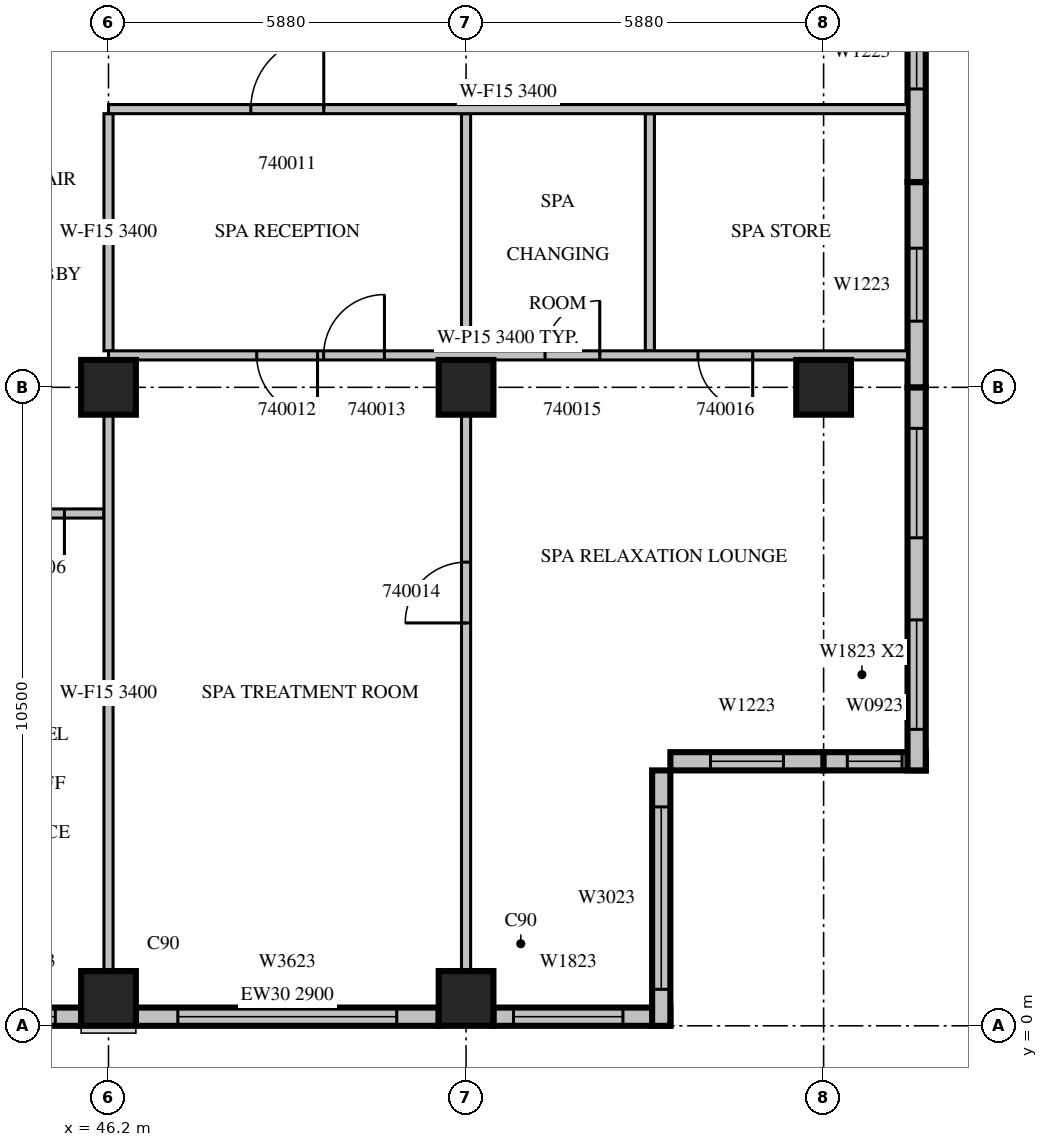
"""IFC4 building model, lengths in metres.
Left out: names, types, materials, properties, quantities, classifications, styles, units other than length and angle.
Written with IfcOpenShell. Run it as: python <this file> out.ifc"""

import sys

from ifc_helpers import new_model, si_unit, direction, frame, frame_2d, origin, origin_2d, place, context, subcontext, project, spatial, rectangle, extrude, source, transform, mapped, element, fill, save


model = new_model("IFC4")
c1 = context("Model", 3, precision=1e-05, world=origin(), true_north=direction((0.0, 1.0)))
c2 = subcontext(c1, "Body", "Model", "MODEL_VIEW")
j1 = project(units=[si_unit("LENGTHUNIT", "METRE"), si_unit("PLANEANGLEUNIT", "RADIAN")], contexts=[c1])
p1 = place(None, origin())
s1 = spatial("IfcSite", under=j1, at=p1, CompositionType="ELEMENT")
p2 = place(p1, origin())
s2 = spatial("IfcBuilding", under=s1, at=p2, CompositionType="ELEMENT")
p3 = place(p2, frame((0.0, 0.0, 185.4)))
s3 = spatial("IfcBuildingStorey", under=s2, at=p3, CompositionType="ELEMENT", Elevation=185.4)
m1 = source(origin(), c2, "Body", "SweptSolid", [
    extrude(rectangle(XDim=0.9, YDim=0.9, at=origin_2d()), origin(), (0.0, 0.0, 1.0), 3.8),
])
for number, where, z_axis, x_axis in (
    (1, (46.2, 0.45, 0.0), (0.0, 0.0, 1.0), (1.0, 0.0, 0.0)),
    (2, (52.08, 0.45, 0.0), (0.0, 0.0, 1.0), (1.0, 0.0, 0.0)),
    (3, (46.2, 10.5, 0.0), (0.0, 0.0, 1.0), (1.0, 0.0, 0.0)),
    (4, (52.08, 10.5, 0.0), (0.0, 0.0, 1.0), (1.0, 0.0, 0.0)),
    (5, (57.96, 10.5, 0.0), (0.0, 0.0, 1.0), (1.0, 0.0, 0.0)),
):
    element("IfcColumn", number, at=place(p3, frame(where, z_axis=z_axis, x_axis=x_axis)), inside=s3, PredefinedType="COLUMN", context=c2, shape_type="MappedRepresentation", body=[
        mapped(m1, transform((0.0, 0.0, 0.0), scale=1.0)),
    ])
m2 = source(origin(), c2, "Body", "SweptSolid", [
    extrude(rectangle(XDim=1.75, YDim=0.3, at=frame_2d((0.875, 0.0))), origin(), (0.0, 0.0, 1.0), 3.4),
])
p4 = place(p3, frame((44.0, 0.15, 0.0), z_axis=(0.0, 0.0, 1.0), x_axis=(1.0, 0.0, 0.0)))
e6 = element("IfcWall", 6, at=p4, inside=s3, PredefinedType="STANDARD", context=c2, shape_type="MappedRepresentation", body=[
    mapped(m2, transform((0.0, 0.0, 0.0), scale=1.0)),
])
m3 = source(origin(), c2, "Body", "SweptSolid", [
    extrude(rectangle(XDim=0.9, YDim=2.3, at=frame_2d((0.45, 1.15))), frame((0.0, 0.16, 0.0), z_axis=(0.0, -1.0, 0.0), x_axis=(1.0, 0.0, 0.0)), (0.0, 0.0, 1.0), 0.32),
])
p5 = place(p4, frame((0.425, 0.0, 0.6)))
e7 = element("IfcOpeningElement", 7, at=p5, cuts=e6, PredefinedType="OPENING", context=c2, shape_type="MappedRepresentation", body=[
    mapped(m3, transform((0.0, 0.0, 0.0), scale=1.0)),
])
p6 = place(p3, frame((46.65, 0.15, 0.0), z_axis=(0.0, 0.0, 1.0), x_axis=(1.0, 0.0, 0.0)))
e8 = element("IfcWall", 8, at=p6, inside=s3, PredefinedType="STANDARD", context=c2, shape_type="SweptSolid", body=[
    extrude(rectangle(XDim=4.98, YDim=0.3, at=frame_2d((2.49, 0.0))), origin(), (0.0, 0.0, 1.0), 2.9),
])
m4 = source(origin(), c2, "Body", "SweptSolid", [
    extrude(rectangle(XDim=3.6, YDim=2.3, at=frame_2d((1.8, 1.15))), frame((0.0, 0.16, 0.0), z_axis=(0.0, -1.0, 0.0), x_axis=(1.0, 0.0, 0.0)), (0.0, 0.0, 1.0), 0.32),
])
p7 = place(p6, frame((0.69, 0.0, 0.6)))
e9 = element("IfcOpeningElement", 9, at=p7, cuts=e8, PredefinedType="OPENING", context=c2, shape_type="MappedRepresentation", body=[
    mapped(m4, transform((0.0, 0.0, 0.0), scale=1.0)),
])
m5 = source(origin(), c2, "Body", "SweptSolid", [
    extrude(rectangle(XDim=2.91, YDim=0.3, at=frame_2d((1.455, 0.0))), origin(), (0.0, 0.0, 1.0), 3.4),
])
p8 = place(p3, frame((52.53, 0.15, 0.0), z_axis=(0.0, 0.0, 1.0), x_axis=(1.0, 0.0, 0.0)))
e10 = element("IfcWall", 10, at=p8, inside=s3, PredefinedType="STANDARD", context=c2, shape_type="MappedRepresentation", body=[
    mapped(m5, transform((0.0, 0.0, 0.0), scale=1.0)),
])
m6 = source(origin(), c2, "Body", "SweptSolid", [
    extrude(rectangle(XDim=1.8, YDim=2.3, at=frame_2d((0.9, 1.15))), frame((0.0, 0.16, 0.0), z_axis=(0.0, -1.0, 0.0), x_axis=(1.0, 0.0, 0.0)), (0.0, 0.0, 1.0), 0.32),
])
p9 = place(p8, frame((0.33, 0.0, 0.6)))
e11 = element("IfcOpeningElement", 11, at=p9, cuts=e10, PredefinedType="OPENING", context=c2, shape_type="MappedRepresentation", body=[
    mapped(m6, transform((0.0, 0.0, 0.0), scale=1.0)),
])
m7 = source(origin(), c2, "Body", "SweptSolid", [
    extrude(rectangle(XDim=4.2, YDim=0.3, at=frame_2d((2.1, 0.0))), origin(), (0.0, 0.0, 1.0), 3.4),
])
p10 = place(p3, frame((55.29, 0.0, 0.0), z_axis=(0.0, 0.0, 1.0), x_axis=(0.0, 1.0, 0.0)))
e12 = element("IfcWall", 12, at=p10, inside=s3, PredefinedType="STANDARD", context=c2, shape_type="MappedRepresentation", body=[
    mapped(m7, transform((0.0, 0.0, 0.0), scale=1.0)),
])
m8 = source(origin(), c2, "Body", "SweptSolid", [
    extrude(rectangle(XDim=3.0, YDim=2.3, at=frame_2d((1.5, 1.15))), frame((0.0, 0.16, 0.0), z_axis=(0.0, -1.0, 0.0), x_axis=(1.0, 0.0, 0.0)), (0.0, 0.0, 1.0), 0.32),
])
p11 = place(p10, frame((0.6, 0.0, 0.6)))
e13 = element("IfcOpeningElement", 13, at=p11, cuts=e12, PredefinedType="OPENING", context=c2, shape_type="MappedRepresentation", body=[
    mapped(m8, transform((0.0, 0.0, 0.0), scale=1.0)),
])
m9 = source(origin(), c2, "Body", "SweptSolid", [
    extrude(rectangle(XDim=2.52, YDim=0.3, at=frame_2d((1.26, 0.0))), origin(), (0.0, 0.0, 1.0), 3.4),
])
p12 = place(p3, frame((55.44, 4.35, 0.0), z_axis=(0.0, 0.0, 1.0), x_axis=(1.0, 0.0, 0.0)))
e14 = element("IfcWall", 14, at=p12, inside=s3, PredefinedType="STANDARD", context=c2, shape_type="MappedRepresentation", body=[
    mapped(m9, transform((0.0, 0.0, 0.0), scale=1.0)),
])
m10 = source(origin(), c2, "Body", "SweptSolid", [
    extrude(rectangle(XDim=1.2, YDim=2.3, at=frame_2d((0.6, 1.15))), frame((0.0, 0.16, 0.0), z_axis=(0.0, -1.0, 0.0), x_axis=(1.0, 0.0, 0.0)), (0.0, 0.0, 1.0), 0.32),
])
p13 = place(p12, frame((0.66, 0.0, 0.6)))
e15 = element("IfcOpeningElement", 15, at=p13, cuts=e14, PredefinedType="OPENING", context=c2, shape_type="MappedRepresentation", body=[
    mapped(m10, transform((0.0, 0.0, 0.0), scale=1.0)),
])
m11 = source(origin(), c2, "Body", "SweptSolid", [
    extrude(rectangle(XDim=1.68, YDim=0.3, at=frame_2d((0.84, 0.0))), origin(), (0.0, 0.0, 1.0), 3.4),
])
p14 = place(p3, frame((57.96, 4.35, 0.0), z_axis=(0.0, 0.0, 1.0), x_axis=(1.0, 0.0, 0.0)))
e16 = element("IfcWall", 16, at=p14, inside=s3, PredefinedType="STANDARD", context=c2, shape_type="MappedRepresentation", body=[
    mapped(m11, transform((0.0, 0.0, 0.0), scale=1.0)),
])
p15 = place(p14, frame((0.39, 0.0, 0.6)))
e17 = element("IfcOpeningElement", 17, at=p15, cuts=e16, PredefinedType="OPENING", context=c2, shape_type="MappedRepresentation", body=[
    mapped(m3, transform((0.0, 0.0, 0.0), scale=1.0)),
])
m12 = source(origin(), c2, "Body", "SweptSolid", [
    extrude(rectangle(XDim=6.3, YDim=0.3, at=frame_2d((3.15, 0.0))), origin(), (0.0, 0.0, 1.0), 3.4),
])
p16 = place(p3, frame((59.49, 4.2, 0.0), z_axis=(0.0, 0.0, 1.0), x_axis=(0.0, 1.0, 0.0)))
e18 = element("IfcWall", 18, at=p16, inside=s3, PredefinedType="STANDARD", context=c2, shape_type="MappedRepresentation", body=[
    mapped(m12, transform((0.0, 0.0, 0.0), scale=1.0)),
])
p17 = place(p16, frame((0.675, 0.0, 0.6)))
e19 = element("IfcOpeningElement", 19, at=p17, cuts=e18, PredefinedType="OPENING", context=c2, shape_type="MappedRepresentation", body=[
    mapped(m6, transform((0.0, 0.0, 0.0), scale=1.0)),
])
p18 = place(p16, frame((3.825, 0.0, 0.6)))
e20 = element("IfcOpeningElement", 20, at=p18, cuts=e18, PredefinedType="OPENING", context=c2, shape_type="MappedRepresentation", body=[
    mapped(m6, transform((0.0, 0.0, 0.0), scale=1.0)),
])
m13 = source(origin(), c2, "Body", "SweptSolid", [
    extrude(rectangle(XDim=3.375, YDim=0.3, at=frame_2d((1.688, 0.0))), origin(), (0.0, 0.0, 1.0), 3.4),
])
p19 = place(p3, frame((59.49, 10.5, 0.0), z_axis=(0.0, 0.0, 1.0), x_axis=(0.0, 1.0, 0.0)))
e21 = element("IfcWall", 21, at=p19, inside=s3, PredefinedType="STANDARD", context=c2, shape_type="MappedRepresentation", body=[
    mapped(m13, transform((0.0, 0.0, 0.0), scale=1.0)),
])
p20 = place(p19, frame((1.087, 0.0, 0.6)))
e22 = element("IfcOpeningElement", 22, at=p20, cuts=e21, PredefinedType="OPENING", context=c2, shape_type="MappedRepresentation", body=[
    mapped(m10, transform((0.0, 0.0, 0.0), scale=1.0)),
])
p21 = place(p3, frame((59.49, 13.875, 0.0), z_axis=(0.0, 0.0, 1.0), x_axis=(0.0, 1.0, 0.0)))
e23 = element("IfcWall", 23, at=p21, inside=s3, PredefinedType="STANDARD", context=c2, shape_type="MappedRepresentation", body=[
    mapped(m13, transform((0.0, 0.0, 0.0), scale=1.0)),
])
p22 = place(p21, frame((1.531, 0.0, 0.6)))
e24 = element("IfcOpeningElement", 24, at=p22, cuts=e23, PredefinedType="OPENING", context=c2, shape_type="MappedRepresentation", body=[
    mapped(m10, transform((0.0, 0.0, 0.0), scale=1.0)),
])
m14 = source(origin(), c2, "Body", "SweptSolid", [
    extrude(rectangle(XDim=2.2, YDim=0.15, at=frame_2d((1.1, 0.0))), origin(), (0.0, 0.0, 1.0), 3.4),
])
p23 = place(p3, frame((46.125, 8.425, 0.0), z_axis=(0.0, 0.0, 1.0), x_axis=(-1.0, 0.0, 0.0)))
e25 = element("IfcWall", 25, at=p23, inside=s3, PredefinedType="PARTITIONING", context=c2, shape_type="MappedRepresentation", body=[
    mapped(m14, transform((0.0, 0.0, 0.0), scale=1.0)),
])
m15 = source(origin(), c2, "Body", "SweptSolid", [
    extrude(rectangle(XDim=0.9, YDim=2.1, at=frame_2d((0.45, 1.05))), frame((0.0, 0.085, 0.0), z_axis=(0.0, -1.0, 0.0), x_axis=(1.0, 0.0, 0.0)), (0.0, 0.0, 1.0), 0.17),
])
p24 = place(p23, frame((0.65, 0.0, 0.0)))
e26 = element("IfcOpeningElement", 26, at=p24, cuts=e25, PredefinedType="OPENING", context=c2, shape_type="MappedRepresentation", body=[
    mapped(m15, transform((0.0, 0.0, 0.0), scale=1.0)),
])
m16 = source(origin(), c2, "Body", "SweptSolid", [
    extrude(rectangle(XDim=9.152, YDim=0.15, at=frame_2d((4.576, 0.0))), origin(), (0.0, 0.0, 1.0), 3.4),
])
p25 = place(p3, frame((52.08, 0.899, 0.0), z_axis=(0.0, 0.0, 1.0), x_axis=(0.0, 1.0, 0.0)))
e27 = element("IfcWall", 27, at=p25, inside=s3, PredefinedType="PARTITIONING", context=c2, shape_type="MappedRepresentation", body=[
    mapped(m16, transform((0.0, 0.0, 0.0), scale=1.0)),
])
m17 = source(origin(), c2, "Body", "SweptSolid", [
    extrude(rectangle(XDim=1.0, YDim=2.1, at=frame_2d((0.5, 1.05))), frame((0.0, 0.085, 0.0), z_axis=(0.0, -1.0, 0.0), x_axis=(1.0, 0.0, 0.0)), (0.0, 0.0, 1.0), 0.17),
])
p26 = place(p25, frame((5.726, 0.0, 0.0)))
e28 = element("IfcOpeningElement", 28, at=p26, cuts=e27, PredefinedType="OPENING", context=c2, shape_type="MappedRepresentation", body=[
    mapped(m17, transform((0.0, 0.0, 0.0), scale=1.0)),
])
m18 = source(origin(), c2, "Body", "SweptSolid", [
    extrude(rectangle(XDim=3.9, YDim=0.15, at=frame_2d((1.95, 0.0))), origin(), (0.0, 0.0, 1.0), 3.4),
])
for number, where, z_axis, x_axis in (
    (29, (52.08, 11.1, 0.0), (0.0, 0.0, 1.0), (0.0, 1.0, 0.0)),
    (30, (55.103, 11.1, 0.0), (0.0, 0.0, 1.0), (0.0, 1.0, 0.0)),
):
    element("IfcWall", number, at=place(p3, frame(where, z_axis=z_axis, x_axis=x_axis)), inside=s3, PredefinedType="PARTITIONING", context=c2, shape_type="MappedRepresentation", body=[
        mapped(m18, transform((0.0, 0.0, 0.0), scale=1.0)),
    ])
p27 = place(p3, frame((46.2, 0.899, 0.0), z_axis=(0.0, 0.0, 1.0), x_axis=(0.0, 1.0, 0.0)))
e31 = element("IfcWall", 31, at=p27, inside=s3, PredefinedType="PARTITIONING", context=c2, shape_type="MappedRepresentation", body=[
    mapped(m16, transform((0.0, 0.0, 0.0), scale=1.0)),
])
p28 = place(p3, frame((46.2, 11.1, 0.0), z_axis=(0.0, 0.0, 1.0), x_axis=(0.0, 1.0, 0.0)))
e32 = element("IfcWall", 32, at=p28, inside=s3, PredefinedType="PARTITIONING", context=c2, shape_type="MappedRepresentation", body=[
    mapped(m18, transform((0.0, 0.0, 0.0), scale=1.0)),
])
m19 = source(origin(), c2, "Body", "SweptSolid", [
    extrude(rectangle(XDim=13.14, YDim=0.15, at=frame_2d((6.57, 0.0))), origin(), (0.0, 0.0, 1.0), 3.4),
])
p29 = place(p3, frame((59.34, 11.025, 0.0), z_axis=(0.0, 0.0, 1.0), x_axis=(-1.0, 0.0, 0.0)))
e33 = element("IfcWall", 33, at=p29, inside=s3, PredefinedType="PARTITIONING", context=c2, shape_type="MappedRepresentation", body=[
    mapped(m19, transform((0.0, 0.0, 0.0), scale=1.0)),
])
p30 = place(p29, frame((9.703, 0.0, 0.0)))
e34 = element("IfcOpeningElement", 34, at=p30, cuts=e33, PredefinedType="OPENING", context=c2, shape_type="MappedRepresentation", body=[
    mapped(m17, transform((0.0, 0.0, 0.0), scale=1.0)),
])
p31 = place(p29, frame((8.602, 0.0, 0.0)))
e35 = element("IfcOpeningElement", 35, at=p31, cuts=e33, PredefinedType="OPENING", context=c2, shape_type="MappedRepresentation", body=[
    mapped(m17, transform((0.0, 0.0, 0.0), scale=1.0)),
])
p32 = place(p29, frame((5.061, 0.0, 0.0)))
e36 = element("IfcOpeningElement", 36, at=p32, cuts=e33, PredefinedType="OPENING", context=c2, shape_type="MappedRepresentation", body=[
    mapped(m15, transform((0.0, 0.0, 0.0), scale=1.0)),
])
p33 = place(p29, frame((2.546, 0.0, 0.0)))
e37 = element("IfcOpeningElement", 37, at=p33, cuts=e33, PredefinedType="OPENING", context=c2, shape_type="MappedRepresentation", body=[
    mapped(m15, transform((0.0, 0.0, 0.0), scale=1.0)),
])
p34 = place(p3, frame((59.34, 15.075, 0.0), z_axis=(0.0, 0.0, 1.0), x_axis=(-1.0, 0.0, 0.0)))
e38 = element("IfcWall", 38, at=p34, inside=s3, PredefinedType="PARTITIONING", context=c2, shape_type="MappedRepresentation", body=[
    mapped(m19, transform((0.0, 0.0, 0.0), scale=1.0)),
])
m20 = source(origin(), c2, "Body", "SweptSolid", [
    extrude(rectangle(XDim=1.2, YDim=2.1, at=frame_2d((0.6, 1.05))), frame((0.0, 0.085, 0.0), z_axis=(0.0, -1.0, 0.0), x_axis=(1.0, 0.0, 0.0)), (0.0, 0.0, 1.0), 0.17),
])
p35 = place(p34, frame((9.6, 0.0, 0.0)))
e39 = element("IfcOpeningElement", 39, at=p35, cuts=e38, PredefinedType="OPENING", context=c2, shape_type="MappedRepresentation", body=[
    mapped(m20, transform((0.0, 0.0, 0.0), scale=1.0)),
])
m21 = source(origin(), c2, "Body", "SweptSolid", [
    extrude(rectangle(XDim=0.9, YDim=2.3, at=frame_2d((0.45, 1.15))), frame((0.0, 0.03, 0.0), z_axis=(0.0, -1.0, 0.0), x_axis=(1.0, 0.0, 0.0)), (0.0, 0.0, 1.0), 0.06),
])
p36 = place(p5, origin())
e40 = element("IfcWindow", 40, at=p36, inside=s3, PartitioningType="SINGLE_PANEL", PredefinedType="WINDOW", context=c2, shape_type="MappedRepresentation", body=[
    mapped(m21, transform((0.0, 0.0, 0.0), scale=1.0)),
])
fill(e7, e40)
m22 = source(origin(), c2, "Body", "SweptSolid", [
    extrude(rectangle(XDim=3.6, YDim=2.3, at=frame_2d((1.8, 1.15))), frame((0.0, 0.03, 0.0), z_axis=(0.0, -1.0, 0.0), x_axis=(1.0, 0.0, 0.0)), (0.0, 0.0, 1.0), 0.06),
])
p37 = place(p7, origin())
e41 = element("IfcWindow", 41, at=p37, inside=s3, PartitioningType="SINGLE_PANEL", PredefinedType="WINDOW", context=c2, shape_type="MappedRepresentation", body=[
    mapped(m22, transform((0.0, 0.0, 0.0), scale=1.0)),
])
fill(e9, e41)
m23 = source(origin(), c2, "Body", "SweptSolid", [
    extrude(rectangle(XDim=1.8, YDim=2.3, at=frame_2d((0.9, 1.15))), frame((0.0, 0.03, 0.0), z_axis=(0.0, -1.0, 0.0), x_axis=(1.0, 0.0, 0.0)), (0.0, 0.0, 1.0), 0.06),
])
p38 = place(p9, origin())
e42 = element("IfcWindow", 42, at=p38, inside=s3, PartitioningType="SINGLE_PANEL", PredefinedType="WINDOW", context=c2, shape_type="MappedRepresentation", body=[
    mapped(m23, transform((0.0, 0.0, 0.0), scale=1.0)),
])
fill(e11, e42)
m24 = source(origin(), c2, "Body", "SweptSolid", [
    extrude(rectangle(XDim=3.0, YDim=2.3, at=frame_2d((1.5, 1.15))), frame((0.0, 0.03, 0.0), z_axis=(0.0, -1.0, 0.0), x_axis=(1.0, 0.0, 0.0)), (0.0, 0.0, 1.0), 0.06),
])
p39 = place(p11, origin())
e43 = element("IfcWindow", 43, at=p39, inside=s3, PartitioningType="SINGLE_PANEL", PredefinedType="WINDOW", context=c2, shape_type="MappedRepresentation", body=[
    mapped(m24, transform((0.0, 0.0, 0.0), scale=1.0)),
])
fill(e13, e43)
m25 = source(origin(), c2, "Body", "SweptSolid", [
    extrude(rectangle(XDim=1.2, YDim=2.3, at=frame_2d((0.6, 1.15))), frame((0.0, 0.03, 0.0), z_axis=(0.0, -1.0, 0.0), x_axis=(1.0, 0.0, 0.0)), (0.0, 0.0, 1.0), 0.06),
])
p40 = place(p13, origin())
e44 = element("IfcWindow", 44, at=p40, inside=s3, PartitioningType="SINGLE_PANEL", PredefinedType="WINDOW", context=c2, shape_type="MappedRepresentation", body=[
    mapped(m25, transform((0.0, 0.0, 0.0), scale=1.0)),
])
fill(e15, e44)
p41 = place(p15, origin())
e45 = element("IfcWindow", 45, at=p41, inside=s3, PartitioningType="SINGLE_PANEL", PredefinedType="WINDOW", context=c2, shape_type="MappedRepresentation", body=[
    mapped(m21, transform((0.0, 0.0, 0.0), scale=1.0)),
])
fill(e17, e45)
p42 = place(p17, origin())
e46 = element("IfcWindow", 46, at=p42, inside=s3, PartitioningType="SINGLE_PANEL", PredefinedType="WINDOW", context=c2, shape_type="MappedRepresentation", body=[
    mapped(m23, transform((0.0, 0.0, 0.0), scale=1.0)),
])
fill(e19, e46)
p43 = place(p18, origin())
e47 = element("IfcWindow", 47, at=p43, inside=s3, PartitioningType="SINGLE_PANEL", PredefinedType="WINDOW", context=c2, shape_type="MappedRepresentation", body=[
    mapped(m23, transform((0.0, 0.0, 0.0), scale=1.0)),
])
fill(e20, e47)
p44 = place(p20, origin())
e48 = element("IfcWindow", 48, at=p44, inside=s3, PartitioningType="SINGLE_PANEL", PredefinedType="WINDOW", context=c2, shape_type="MappedRepresentation", body=[
    mapped(m25, transform((0.0, 0.0, 0.0), scale=1.0)),
])
fill(e22, e48)
p45 = place(p22, origin())
e49 = element("IfcWindow", 49, at=p45, inside=s3, PartitioningType="SINGLE_PANEL", PredefinedType="WINDOW", context=c2, shape_type="MappedRepresentation", body=[
    mapped(m25, transform((0.0, 0.0, 0.0), scale=1.0)),
])
fill(e24, e49)
m26 = source(origin(), c2, "Body", "SweptSolid", [
    extrude(rectangle(XDim=0.9, YDim=2.1, at=frame_2d((0.45, 1.05))), frame((0.0, 0.025, 0.0), z_axis=(0.0, -1.0, 0.0), x_axis=(1.0, 0.0, 0.0)), (0.0, 0.0, 1.0), 0.05),
])
p46 = place(p24, origin())
e50 = element("IfcDoor", 50, at=p46, inside=s3, OperationType="SINGLE_SWING_LEFT", PredefinedType="DOOR", context=c2, shape_type="MappedRepresentation", body=[
    mapped(m26, transform((0.0, 0.0, 0.0), scale=1.0)),
])
fill(e26, e50)
m27 = source(origin(), c2, "Body", "SweptSolid", [
    extrude(rectangle(XDim=1.2, YDim=2.1, at=frame_2d((0.6, 1.05))), frame((0.0, 0.025, 0.0), z_axis=(0.0, -1.0, 0.0), x_axis=(1.0, 0.0, 0.0)), (0.0, 0.0, 1.0), 0.05),
])
p47 = place(p35, origin())
e51 = element("IfcDoor", 51, at=p47, inside=s3, OperationType="SINGLE_SWING_RIGHT", PredefinedType="DOOR", context=c2, shape_type="MappedRepresentation", body=[
    mapped(m27, transform((0.0, 0.0, 0.0), scale=1.0)),
])
fill(e39, e51)
m28 = source(origin(), c2, "Body", "SweptSolid", [
    extrude(rectangle(XDim=1.0, YDim=2.1, at=frame_2d((0.5, 1.05))), frame((0.0, 0.025, 0.0), z_axis=(0.0, -1.0, 0.0), x_axis=(1.0, 0.0, 0.0)), (0.0, 0.0, 1.0), 0.05),
])
p48 = place(p30, origin())
e52 = element("IfcDoor", 52, at=p48, inside=s3, OperationType="SINGLE_SWING_LEFT", PredefinedType="DOOR", context=c2, shape_type="MappedRepresentation", body=[
    mapped(m28, transform((0.0, 0.0, 0.0), scale=1.0)),
])
fill(e34, e52)
p49 = place(p31, origin())
e53 = element("IfcDoor", 53, at=p49, inside=s3, OperationType="SINGLE_SWING_RIGHT", PredefinedType="DOOR", context=c2, shape_type="MappedRepresentation", body=[
    mapped(m28, transform((0.0, 0.0, 0.0), scale=1.0)),
])
fill(e35, e53)
p50 = place(p26, origin())
e54 = element("IfcDoor", 54, at=p50, inside=s3, OperationType="SINGLE_SWING_LEFT", PredefinedType="DOOR", context=c2, shape_type="MappedRepresentation", body=[
    mapped(m28, transform((0.0, 0.0, 0.0), scale=1.0)),
])
fill(e28, e54)
p51 = place(p32, origin())
e55 = element("IfcDoor", 55, at=p51, inside=s3, OperationType="SINGLE_SWING_RIGHT", PredefinedType="DOOR", context=c2, shape_type="MappedRepresentation", body=[
    mapped(m26, transform((0.0, 0.0, 0.0), scale=1.0)),
])
fill(e36, e55)
p52 = place(p33, origin())
e56 = element("IfcDoor", 56, at=p52, inside=s3, OperationType="SINGLE_SWING_LEFT", PredefinedType="DOOR", context=c2, shape_type="MappedRepresentation", body=[
    mapped(m26, transform((0.0, 0.0, 0.0), scale=1.0)),
])
fill(e37, e56)
save(model, sys.argv[1])
